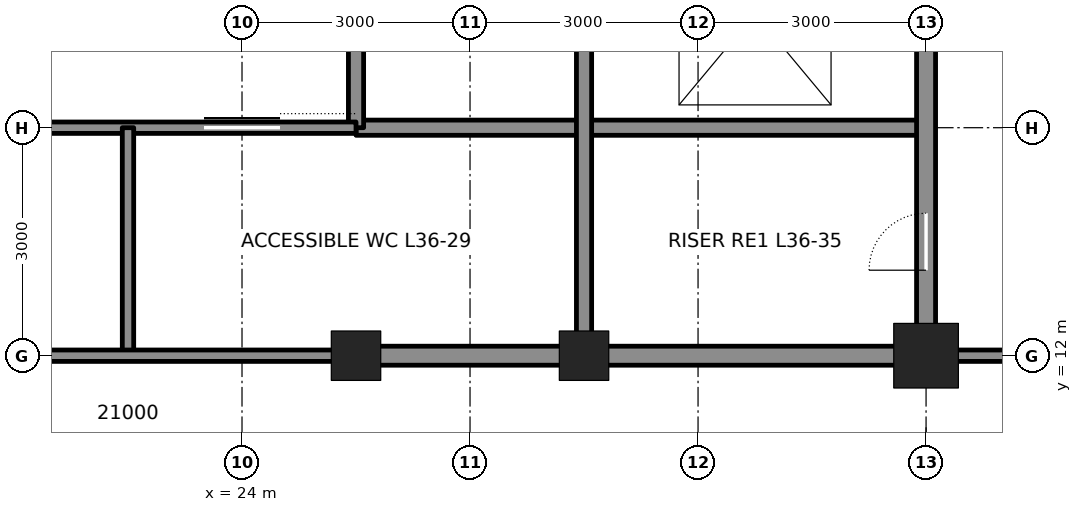
"""IFC4 building model, lengths in metres.
Left out: names, types, materials, properties, quantities, classifications, styles, units other than length and angle.
Written with IfcOpenShell. Run it as: python <this file> out.ifc"""

import sys

from ifc_helpers import new_model, si_unit, direction, frame, frame_2d, origin, origin_2d, place, context, subcontext, project, spatial, rectangle, hollow_rectangle, extrude, element, fill, save


model = new_model("IFC4")
c1 = context("Model", 3, precision=1e-05, world=origin(), true_north=direction((0.0, 1.0)))
c2 = subcontext(c1, "Body", "Model", "MODEL_VIEW")
j1 = project(units=[si_unit("LENGTHUNIT", "METRE"), si_unit("PLANEANGLEUNIT", "RADIAN")], contexts=[c1])
p1 = place(None, origin())
s1 = spatial("IfcSite", under=j1, at=p1, CompositionType="ELEMENT")
p2 = place(p1, origin())
s2 = spatial("IfcBuilding", under=s1, at=p2, CompositionType="ELEMENT")
p3 = place(p2, frame((0.0, 0.0, 165.6)))
s3 = spatial("IfcBuildingStorey", under=s2, at=p3, CompositionType="ELEMENT", Elevation=165.6)
for number, where, z_axis, x_axis in (
    (1, (25.5, 12.0, 0.0), (0.0, 0.0, 1.0), (1.0, 0.0, 0.0)),
    (2, (28.5, 12.0, 0.0), (0.0, 0.0, 1.0), (1.0, 0.0, 0.0)),
):
    element("IfcColumn", number, at=place(p3, frame(where, z_axis=z_axis, x_axis=x_axis)), inside=s3, PredefinedType="COLUMN", context=c2, shape_type="SweptSolid", body=[
        extrude(hollow_rectangle(XDim=0.65, YDim=0.65, WallThickness=0.065, at=origin_2d()), origin(), (0.0, 0.0, 1.0), 4.2),
    ])
p4 = place(p3, frame((33.0, 12.0, 0.0), z_axis=(0.0, 0.0, 1.0), x_axis=(1.0, 0.0, 0.0)))
e3 = element("IfcColumn", 3, at=p4, inside=s3, PredefinedType="COLUMN", context=c2, shape_type="SweptSolid", body=[
    extrude(hollow_rectangle(XDim=0.85, YDim=0.85, WallThickness=0.085, at=origin_2d()), origin(), (0.0, 0.0, 1.0), 4.2),
])
p5 = place(p3, frame((25.75, 12.0, 0.0), z_axis=(0.0, 0.0, 1.0), x_axis=(1.0, 0.0, 0.0)))
e4 = element("IfcWall", 4, at=p5, inside=s3, PredefinedType="SOLIDWALL", context=c2, shape_type="SweptSolid", body=[
    extrude(rectangle(XDim=2.5, YDim=0.25, at=frame_2d((1.25, 0.0))), origin(), (0.0, 0.0, 1.0), 3.181),
])
p6 = place(p3, frame((28.75, 12.0, 0.0), z_axis=(0.0, 0.0, 1.0), x_axis=(1.0, 0.0, 0.0)))
e5 = element("IfcWall", 5, at=p6, inside=s3, PredefinedType="SOLIDWALL", context=c2, shape_type="SweptSolid", body=[
    extrude(rectangle(XDim=4.0, YDim=0.25, at=frame_2d((2.0, 0.0))), origin(), (0.0, 0.0, 1.0), 3.181),
])
p7 = place(p3, frame((25.5, 15.0, 0.0), z_axis=(0.0, 0.0, 1.0), x_axis=(1.0, 0.0, 0.0)))
e6 = element("IfcWall", 6, at=p7, inside=s3, PredefinedType="SOLIDWALL", context=c2, shape_type="SweptSolid", body=[
    extrude(rectangle(XDim=7.5, YDim=0.2, at=frame_2d((3.75, 0.0))), origin(), (0.0, 0.0, 1.0), 4.04),
])
p8 = place(p3, frame((25.5, 15.0, 0.0), z_axis=(0.0, 0.0, 1.0), x_axis=(0.0, 1.0, 0.0)))
e7 = element("IfcWall", 7, at=p8, inside=s3, PredefinedType="SOLIDWALL", context=c2, shape_type="SweptSolid", body=[
    extrude(rectangle(XDim=12.0, YDim=0.2, at=frame_2d((6.0, 0.0))), origin(), (0.0, 0.0, 1.0), 3.064),
])
p9 = place(p3, frame((28.5, 12.25, 0.0), z_axis=(0.0, 0.0, 1.0), x_axis=(0.0, 1.0, 0.0)))
e8 = element("IfcWall", 8, at=p9, inside=s3, PredefinedType="SOLIDWALL", context=c2, shape_type="SweptSolid", body=[
    extrude(rectangle(XDim=8.5, YDim=0.2, at=frame_2d((4.25, 0.0))), origin(), (0.0, 0.0, 1.0), 3.113),
])
p10 = place(p3, frame((33.0, 12.25, 0.0), z_axis=(0.0, 0.0, 1.0), x_axis=(0.0, 1.0, 0.0)))
e9 = element("IfcWall", 9, at=p10, inside=s3, PredefinedType="SOLIDWALL", context=c2, shape_type="SweptSolid", body=[
    extrude(rectangle(XDim=8.5, YDim=0.25, at=frame_2d((4.25, 0.0))), origin(), (0.0, 0.0, 1.0), 3.113),
])
p11 = place(p10, frame((6.65, 0.0, 0.0)))
e10 = element("IfcOpeningElement", 10, at=p11, cuts=e9, PredefinedType="OPENING", context=c2, shape_type="SweptSolid", body=[
    extrude(rectangle(XDim=1.2, YDim=2.1, at=frame_2d((0.6, 1.05))), frame((0.0, 0.135, 0.0), z_axis=(0.0, -1.0, 0.0), x_axis=(1.0, 0.0, 0.0)), (0.0, 0.0, 1.0), 0.27),
])
p12 = place(p10, frame((0.875, 0.0, 0.0)))
e11 = element("IfcOpeningElement", 11, at=p12, cuts=e9, PredefinedType="OPENING", context=c2, shape_type="SweptSolid", body=[
    extrude(rectangle(XDim=0.75, YDim=2.1, at=frame_2d((0.375, 1.05))), frame((0.0, 0.135, 0.0), z_axis=(0.0, -1.0, 0.0), x_axis=(1.0, 0.0, 0.0)), (0.0, 0.0, 1.0), 0.27),
])
p13 = place(p3, frame((19.5, 15.0, 0.0), z_axis=(0.0, 0.0, 1.0), x_axis=(1.0, 0.0, 0.0)))
e12 = element("IfcWall", 12, at=p13, inside=s3, PredefinedType="PARTITIONING", context=c2, shape_type="SweptSolid", body=[
    extrude(rectangle(XDim=6.0, YDim=0.15, at=frame_2d((3.0, 0.0))), origin(), (0.0, 0.0, 1.0), 4.04),
])
p14 = place(p13, frame((4.0, 0.0, 0.0)))
e13 = element("IfcOpeningElement", 13, at=p14, cuts=e12, PredefinedType="OPENING", context=c2, shape_type="SweptSolid", body=[
    extrude(rectangle(XDim=1.0, YDim=2.1, at=frame_2d((0.5, 1.05))), frame((0.0, 0.085, 0.0), z_axis=(0.0, -1.0, 0.0), x_axis=(1.0, 0.0, 0.0)), (0.0, 0.0, 1.0), 0.17),
])
p15 = place(p13, frame((1.05, 0.0, 0.0)))
e14 = element("IfcOpeningElement", 14, at=p15, cuts=e12, PredefinedType="OPENING", context=c2, shape_type="SweptSolid", body=[
    extrude(rectangle(XDim=0.9, YDim=2.1, at=frame_2d((0.45, 1.05))), frame((0.0, 0.085, 0.0), z_axis=(0.0, -1.0, 0.0), x_axis=(1.0, 0.0, 0.0)), (0.0, 0.0, 1.0), 0.17),
])
p16 = place(p3, frame((22.5, 15.0, 0.0), z_axis=(0.0, 0.0, 1.0), x_axis=(0.0, -1.0, 0.0)))
e15 = element("IfcWall", 15, at=p16, inside=s3, PredefinedType="PARTITIONING", context=c2, shape_type="SweptSolid", body=[
    extrude(rectangle(XDim=3.0, YDim=0.15, at=frame_2d((1.5, 0.0))), origin(), (0.0, 0.0, 1.0), 4.04),
])
p17 = place(p3, frame((19.5, 12.0, 0.0), z_axis=(0.0, 0.0, 1.0), x_axis=(1.0, 0.0, 0.0)))
e16 = element("IfcWall", 16, at=p17, inside=s3, PredefinedType="PARTITIONING", context=c2, shape_type="SweptSolid", body=[
    extrude(rectangle(XDim=6.0, YDim=0.15, at=frame_2d((3.0, 0.0))), origin(), (0.0, 0.0, 1.0), 3.181),
])
p18 = place(p3, frame((33.0, 12.0, 0.0), z_axis=(0.0, 0.0, 1.0), x_axis=(1.0, 0.0, 0.0)))
e17 = element("IfcWall", 17, at=p18, inside=s3, PredefinedType="PARTITIONING", context=c2, shape_type="SweptSolid", body=[
    extrude(rectangle(XDim=1.8, YDim=0.15, at=frame_2d((0.9, 0.0))), origin(), (0.0, 0.0, 1.0), 3.27),
])
p19 = place(p12, origin())
e18 = element("IfcDoor", 18, at=p19, inside=s3, OperationType="SINGLE_SWING_LEFT", PredefinedType="DOOR", context=c2, shape_type="SweptSolid", body=[
    extrude(rectangle(XDim=0.75, YDim=2.1, at=frame_2d((0.375, 1.05))), frame((0.0, 0.025, 0.0), z_axis=(0.0, -1.0, 0.0), x_axis=(1.0, 0.0, 0.0)), (0.0, 0.0, 1.0), 0.05),
])
fill(e11, e18)
p20 = place(p14, origin())
e19 = element("IfcDoor", 19, at=p20, inside=s3, OperationType="SLIDING_TO_LEFT", PredefinedType="DOOR", context=c2, shape_type="SweptSolid", body=[
    extrude(rectangle(XDim=1.0, YDim=2.1, at=frame_2d((0.5, 1.05))), frame((0.0, 0.025, 0.0), z_axis=(0.0, -1.0, 0.0), x_axis=(1.0, 0.0, 0.0)), (0.0, 0.0, 1.0), 0.05),
])
fill(e13, e19)
save(model, sys.argv[1])
